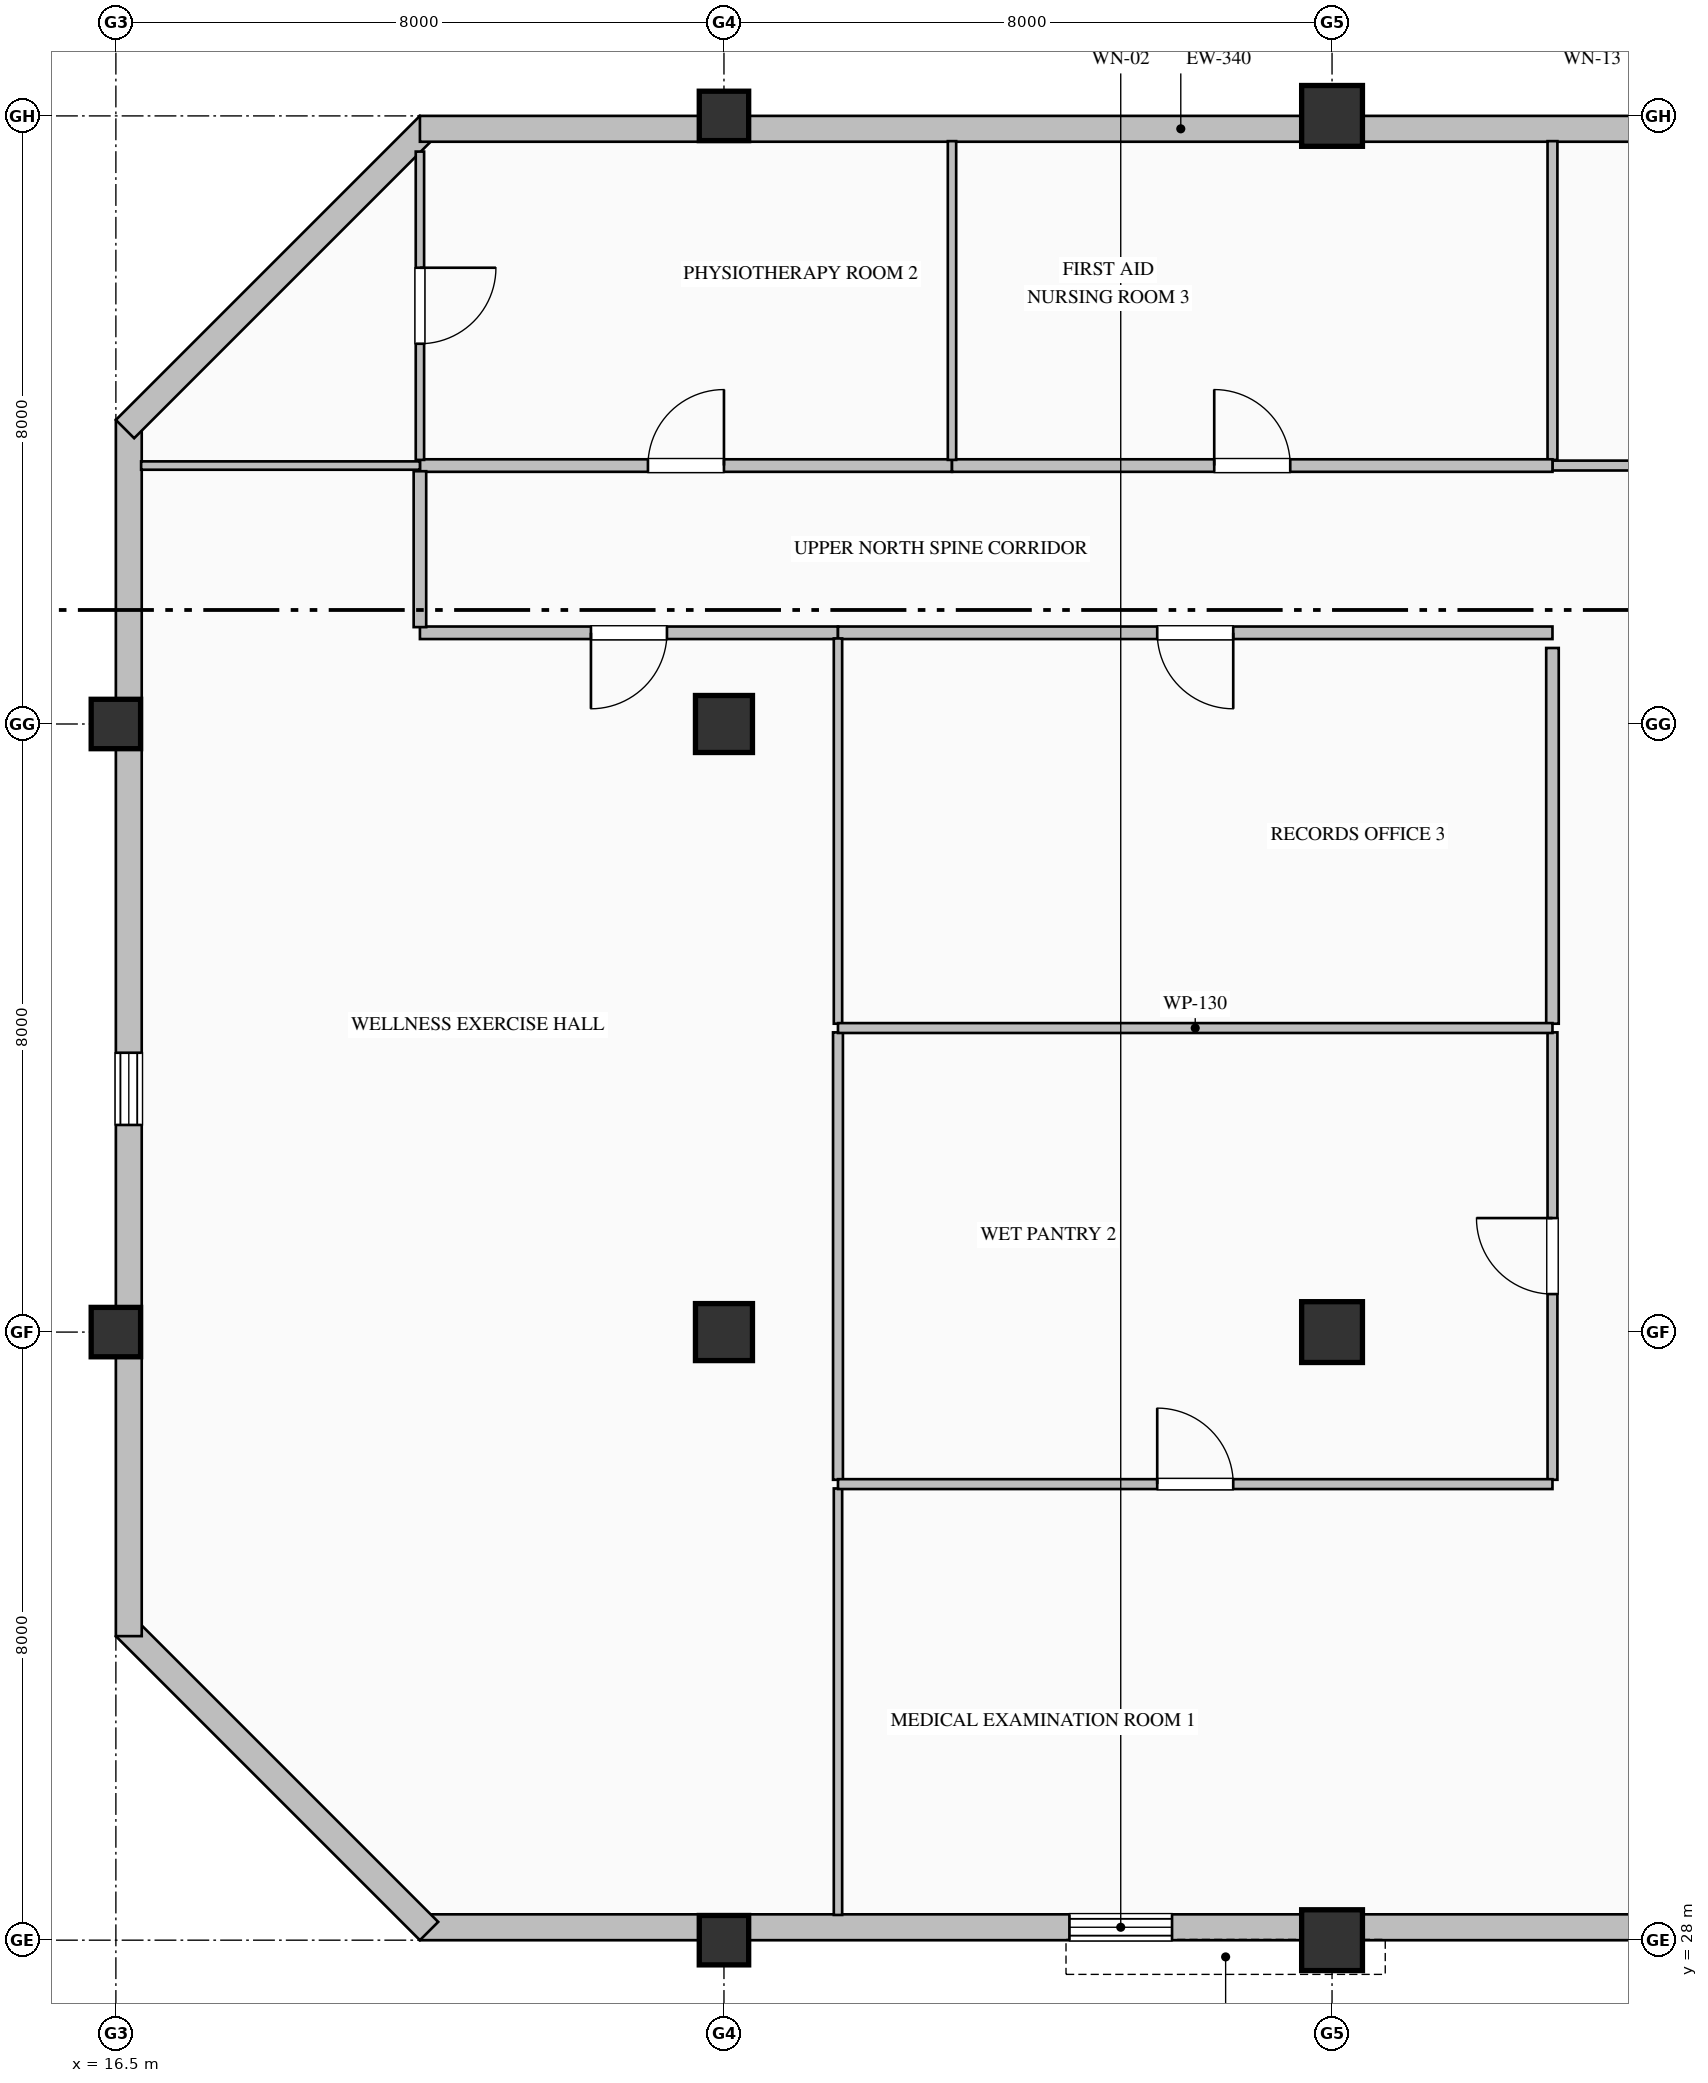
"""IFC4 building model, lengths in metres.
Left out: names, types, materials, properties, quantities, classifications, styles, units other than length and angle.
Written with IfcOpenShell. Run it as: python <this file> out.ifc"""

import sys

from ifc_helpers import new_model, si_unit, direction, frame, frame_2d, origin, origin_2d, place, context, subcontext, project, spatial, rectangle, hollow_rectangle, extrude, element, fill, save


model = new_model("IFC4")
c1 = context("Model", 3, precision=1e-05, world=origin(), true_north=direction((0.0, 1.0)))
c2 = subcontext(c1, "Body", "Model", "MODEL_VIEW")
j1 = project(units=[si_unit("LENGTHUNIT", "METRE"), si_unit("PLANEANGLEUNIT", "RADIAN")], contexts=[c1])
p1 = place(None, origin())
s1 = spatial("IfcSite", under=j1, at=p1, CompositionType="ELEMENT")
p2 = place(p1, origin())
s2 = spatial("IfcBuilding", under=s1, at=p2, CompositionType="ELEMENT")
p3 = place(p2, frame((0.0, 0.0, 343.2)))
s3 = spatial("IfcBuildingStorey", under=s2, at=p3, CompositionType="ELEMENT", Elevation=343.2)
for number, where, z_axis, x_axis in (
    (1, (16.5, 36.0, 0.0), (0.0, 0.0, 1.0), (1.0, 0.0, 0.0)),
    (2, (16.5, 44.0, 0.0), (0.0, 0.0, 1.0), (1.0, 0.0, 0.0)),
    (3, (24.5, 28.0, 0.0), (0.0, 0.0, 1.0), (1.0, 0.0, 0.0)),
):
    element("IfcColumn", number, at=place(p3, frame(where, z_axis=z_axis, x_axis=x_axis)), inside=s3, PredefinedType="COLUMN", context=c2, shape_type="SweptSolid", body=[
        extrude(hollow_rectangle(XDim=0.65, YDim=0.65, WallThickness=0.028, at=origin_2d()), origin(), (0.0, 0.0, 1.0), 4.0),
    ])
for number, where, z_axis, x_axis in (
    (4, (24.5, 36.0, 0.0), (0.0, 0.0, 1.0), (1.0, 0.0, 0.0)),
    (5, (24.5, 44.0, 0.0), (0.0, 0.0, 1.0), (1.0, 0.0, 0.0)),
):
    element("IfcColumn", number, at=place(p3, frame(where, z_axis=z_axis, x_axis=x_axis)), inside=s3, PredefinedType="COLUMN", context=c2, shape_type="SweptSolid", body=[
        extrude(rectangle(XDim=0.75, YDim=0.75, at=origin_2d()), origin(), (0.0, 0.0, 1.0), 4.0),
    ])
p4 = place(p3, frame((24.5, 52.0, 0.0), z_axis=(0.0, 0.0, 1.0), x_axis=(1.0, 0.0, 0.0)))
e6 = element("IfcColumn", 6, at=p4, inside=s3, PredefinedType="COLUMN", context=c2, shape_type="SweptSolid", body=[
    extrude(hollow_rectangle(XDim=0.65, YDim=0.65, WallThickness=0.028, at=origin_2d()), origin(), (0.0, 0.0, 1.0), 4.0),
])
for number, where, z_axis, x_axis in (
    (7, (32.5, 28.0, 0.0), (0.0, 0.0, 1.0), (1.0, 0.0, 0.0)),
    (8, (32.5, 36.0, 0.0), (0.0, 0.0, 1.0), (1.0, 0.0, 0.0)),
    (9, (32.5, 52.0, 0.0), (0.0, 0.0, 1.0), (1.0, 0.0, 0.0)),
):
    element("IfcColumn", number, at=place(p3, frame(where, z_axis=z_axis, x_axis=x_axis)), inside=s3, PredefinedType="COLUMN", context=c2, shape_type="SweptSolid", body=[
        extrude(hollow_rectangle(XDim=0.8, YDim=0.8, WallThickness=0.032, at=origin_2d()), origin(), (0.0, 0.0, 1.0), 4.0),
    ])
p5 = place(p3, frame((40.52, 28.17, 0.0), z_axis=(0.0, 0.0, 1.0), x_axis=(-1.0, 0.0, 0.0)))
e10 = element("IfcWall", 10, at=p5, inside=s3, PredefinedType="SOLIDWALL", context=c2, shape_type="SweptSolid", body=[
    extrude(rectangle(XDim=20.02, YDim=0.34, at=frame_2d((10.01, 0.0))), origin(), (0.0, 0.0, 1.0), 3.185),
])
p6 = place(p5, frame((3.125, 0.0, 0.9)))
e11 = element("IfcOpeningElement", 11, at=p6, cuts=e10, PredefinedType="OPENING", context=c2, shape_type="SweptSolid", body=[
    extrude(rectangle(XDim=0.95, YDim=1.85, at=frame_2d((0.475, 0.925))), frame((0.0, 0.18, 0.0), z_axis=(0.0, -1.0, 0.0), x_axis=(1.0, 0.0, 0.0)), (0.0, 0.0, 1.0), 0.36),
])
p7 = place(p5, frame((10.125, 0.0, 0.9)))
e12 = element("IfcOpeningElement", 12, at=p7, cuts=e10, PredefinedType="OPENING", context=c2, shape_type="SweptSolid", body=[
    extrude(rectangle(XDim=1.35, YDim=1.85, at=frame_2d((0.675, 0.925))), frame((0.0, 0.18, 0.0), z_axis=(0.0, -1.0, 0.0), x_axis=(1.0, 0.0, 0.0)), (0.0, 0.0, 1.0), 0.36),
])
p8 = place(p3, frame((20.62, 28.12, 0.0), z_axis=(0.0, 0.0, 1.0), x_axis=(-0.707106781187, 0.707106781187, 0.0)))
e13 = element("IfcWall", 13, at=p8, inside=s3, PredefinedType="SOLIDWALL", context=c2, shape_type="SweptSolid", body=[
    extrude(rectangle(XDim=5.657, YDim=0.34, at=frame_2d((2.828, 0.0))), origin(), (0.0, 0.0, 1.0), 3.785),
])
p9 = place(p3, frame((16.67, 32.0, 0.0), z_axis=(0.0, 0.0, 1.0), x_axis=(0.0, 1.0, 0.0)))
e14 = element("IfcWall", 14, at=p9, inside=s3, PredefinedType="SOLIDWALL", context=c2, shape_type="SweptSolid", body=[
    extrude(rectangle(XDim=16.0, YDim=0.34, at=frame_2d((8.0, 0.0))), origin(), (0.0, 0.0, 1.0), 3.335),
])
p10 = place(p9, frame((6.725, 0.0, 0.9)))
e15 = element("IfcOpeningElement", 15, at=p10, cuts=e14, PredefinedType="OPENING", context=c2, shape_type="SweptSolid", body=[
    extrude(rectangle(XDim=0.95, YDim=1.85, at=frame_2d((0.475, 0.925))), frame((0.0, 0.18, 0.0), z_axis=(0.0, -1.0, 0.0), x_axis=(1.0, 0.0, 0.0)), (0.0, 0.0, 1.0), 0.36),
])
p11 = place(p3, frame((16.62, 47.88, 0.0), z_axis=(0.0, 0.0, 1.0), x_axis=(0.707106781187, 0.707106781187, 0.0)))
e16 = element("IfcWall", 16, at=p11, inside=s3, PredefinedType="SOLIDWALL", context=c2, shape_type="SweptSolid", body=[
    extrude(rectangle(XDim=5.657, YDim=0.34, at=frame_2d((2.828, 0.0))), origin(), (0.0, 0.0, 1.0), 3.785),
])
p12 = place(p3, frame((20.5, 51.83, 0.0), z_axis=(0.0, 0.0, 1.0), x_axis=(1.0, 0.0, 0.0)))
e17 = element("IfcWall", 17, at=p12, inside=s3, PredefinedType="SOLIDWALL", context=c2, shape_type="SweptSolid", body=[
    extrude(rectangle(XDim=20.02, YDim=0.34, at=frame_2d((10.01, 0.0))), origin(), (0.0, 0.0, 1.0), 3.335),
])
p13 = place(p3, frame((37.8, 47.4, 0.0), z_axis=(0.0, 0.0, 1.0), x_axis=(-1.0, 0.0, 0.0)))
e18 = element("IfcWall", 18, at=p13, inside=s3, PredefinedType="PARTITIONING", context=c2, shape_type="SweptSolid", body=[
    extrude(rectangle(XDim=2.4, YDim=0.13, at=frame_2d((1.2, 0.0))), origin(), (0.0, 0.0, 1.0), 3.785),
])
p14 = place(p3, frame((35.4, 47.475, 0.0), z_axis=(0.0, 0.0, 1.0), x_axis=(0.0, 1.0, 0.0)))
e19 = element("IfcWall", 19, at=p14, inside=s3, PredefinedType="PARTITIONING", context=c2, shape_type="SweptSolid", body=[
    extrude(rectangle(XDim=4.193, YDim=0.13, at=frame_2d((2.097, 0.0))), origin(), (0.0, 0.0, 1.0), 3.785),
])
p15 = place(p3, frame((20.5, 47.4, 0.0), z_axis=(0.0, 0.0, 1.0), x_axis=(1.0, 0.0, 0.0)))
e20 = element("IfcWall", 20, at=p15, inside=s3, PredefinedType="PARTITIONING", context=c2, shape_type="SweptSolid", body=[
    extrude(rectangle(XDim=7.0, YDim=0.165, at=frame_2d((3.5, 0.0))), origin(), (0.0, 0.0, 1.0), 3.785),
])
p16 = place(p15, frame((3.0, 0.0, 0.0)))
e21 = element("IfcOpeningElement", 21, at=p16, cuts=e20, PredefinedType="OPENING", context=c2, shape_type="SweptSolid", body=[
    extrude(rectangle(XDim=1.0, YDim=2.15, at=frame_2d((0.5, 1.075))), frame((0.0, 0.093, 0.0), z_axis=(0.0, -1.0, 0.0), x_axis=(1.0, 0.0, 0.0)), (0.0, 0.0, 1.0), 0.185),
])
p17 = place(p3, frame((27.5, 47.4, 0.0), z_axis=(0.0, 0.0, 1.0), x_axis=(1.0, 0.0, 0.0)))
e22 = element("IfcWall", 22, at=p17, inside=s3, PredefinedType="PARTITIONING", context=c2, shape_type="SweptSolid", body=[
    extrude(rectangle(XDim=7.9, YDim=0.165, at=frame_2d((3.95, 0.0))), origin(), (0.0, 0.0, 1.0), 3.785),
])
p18 = place(p17, frame((3.45, 0.0, 0.0)))
e23 = element("IfcOpeningElement", 23, at=p18, cuts=e22, PredefinedType="OPENING", context=c2, shape_type="SweptSolid", body=[
    extrude(rectangle(XDim=1.0, YDim=2.15, at=frame_2d((0.5, 1.075))), frame((0.0, 0.093, 0.0), z_axis=(0.0, -1.0, 0.0), x_axis=(1.0, 0.0, 0.0)), (0.0, 0.0, 1.0), 0.185),
])
p19 = place(p3, frame((26.0, 45.2, 0.0), z_axis=(0.0, 0.0, 1.0), x_axis=(-1.0, 0.0, 0.0)))
e24 = element("IfcWall", 24, at=p19, inside=s3, PredefinedType="PARTITIONING", context=c2, shape_type="SweptSolid", body=[
    extrude(rectangle(XDim=5.5, YDim=0.165, at=frame_2d((2.75, 0.0))), origin(), (0.0, 0.0, 1.0), 3.785),
])
p20 = place(p19, frame((2.25, 0.0, 0.0)))
e25 = element("IfcOpeningElement", 25, at=p20, cuts=e24, PredefinedType="OPENING", context=c2, shape_type="SweptSolid", body=[
    extrude(rectangle(XDim=1.0, YDim=2.15, at=frame_2d((0.5, 1.075))), frame((0.0, 0.093, 0.0), z_axis=(0.0, -1.0, 0.0), x_axis=(1.0, 0.0, 0.0)), (0.0, 0.0, 1.0), 0.185),
])
p21 = place(p3, frame((20.5, 45.274, 0.0), z_axis=(0.0, 0.0, 1.0), x_axis=(0.0, 1.0, 0.0)))
e26 = element("IfcWall", 26, at=p21, inside=s3, PredefinedType="PARTITIONING", context=c2, shape_type="SweptSolid", body=[
    extrude(rectangle(XDim=2.051, YDim=0.165, at=frame_2d((1.025, 0.0))), origin(), (0.0, 0.0, 1.0), 3.785),
])
p22 = place(p3, frame((35.4, 45.2, 0.0), z_axis=(0.0, 0.0, 1.0), x_axis=(-1.0, 0.0, 0.0)))
e27 = element("IfcWall", 27, at=p22, inside=s3, PredefinedType="PARTITIONING", context=c2, shape_type="SweptSolid", body=[
    extrude(rectangle(XDim=9.4, YDim=0.165, at=frame_2d((4.7, 0.0))), origin(), (0.0, 0.0, 1.0), 3.785),
])
p23 = place(p22, frame((4.2, 0.0, 0.0)))
e28 = element("IfcOpeningElement", 28, at=p23, cuts=e27, PredefinedType="OPENING", context=c2, shape_type="SweptSolid", body=[
    extrude(rectangle(XDim=1.0, YDim=2.15, at=frame_2d((0.5, 1.075))), frame((0.0, 0.093, 0.0), z_axis=(0.0, -1.0, 0.0), x_axis=(1.0, 0.0, 0.0)), (0.0, 0.0, 1.0), 0.185),
])
p24 = place(p3, frame((35.4, 34.057, 0.0), z_axis=(0.0, 0.0, 1.0), x_axis=(0.0, 1.0, 0.0)))
e29 = element("IfcWall", 29, at=p24, inside=s3, PredefinedType="PARTITIONING", context=c2, shape_type="SweptSolid", body=[
    extrude(rectangle(XDim=5.886, YDim=0.13, at=frame_2d((2.943, 0.0))), origin(), (0.0, 0.0, 1.0), 3.785),
])
p25 = place(p24, frame((2.443, 0.0, 0.0)))
e30 = element("IfcOpeningElement", 30, at=p25, cuts=e29, PredefinedType="OPENING", context=c2, shape_type="SweptSolid", body=[
    extrude(rectangle(XDim=1.0, YDim=2.15, at=frame_2d((0.5, 1.075))), frame((0.0, 0.075, 0.0), z_axis=(0.0, -1.0, 0.0), x_axis=(1.0, 0.0, 0.0)), (0.0, 0.0, 1.0), 0.15),
])
p26 = place(p3, frame((35.4, 40.057, 0.0), z_axis=(0.0, 0.0, 1.0), x_axis=(0.0, 1.0, 0.0)))
e31 = element("IfcWall", 31, at=p26, inside=s3, PredefinedType="PARTITIONING", context=c2, shape_type="SweptSolid", body=[
    extrude(rectangle(XDim=4.943, YDim=0.165, at=frame_2d((2.472, 0.0))), origin(), (0.0, 0.0, 1.0), 3.785),
])
p27 = place(p3, frame((20.5, 51.531, 0.0), z_axis=(0.0, 0.0, 1.0), x_axis=(0.0, -1.0, 0.0)))
e32 = element("IfcWall", 32, at=p27, inside=s3, PredefinedType="MOVABLE", context=c2, shape_type="SweptSolid", body=[
    extrude(rectangle(XDim=4.056, YDim=0.11, at=frame_2d((2.028, 0.0))), origin(), (0.0, 0.0, 1.0), 3.785),
])
p28 = place(p27, frame((1.528, 0.0, 0.0)))
e33 = element("IfcOpeningElement", 33, at=p28, cuts=e32, PredefinedType="OPENING", context=c2, shape_type="SweptSolid", body=[
    extrude(rectangle(XDim=1.0, YDim=2.15, at=frame_2d((0.5, 1.075))), frame((0.0, 0.065, 0.0), z_axis=(0.0, -1.0, 0.0), x_axis=(1.0, 0.0, 0.0)), (0.0, 0.0, 1.0), 0.13),
])
p29 = place(p3, frame((20.5, 47.4, 0.0), z_axis=(0.0, 0.0, 1.0), x_axis=(-1.0, 0.0, 0.0)))
e34 = element("IfcWall", 34, at=p29, inside=s3, PredefinedType="MOVABLE", context=c2, shape_type="SweptSolid", body=[
    extrude(rectangle(XDim=3.668, YDim=0.11, at=frame_2d((1.834, 0.0))), origin(), (0.0, 0.0, 1.0), 3.785),
])
p30 = place(p3, frame((27.5, 51.668, 0.0), z_axis=(0.0, 0.0, 1.0), x_axis=(0.0, -1.0, 0.0)))
e35 = element("IfcWall", 35, at=p30, inside=s3, PredefinedType="MOVABLE", context=c2, shape_type="SweptSolid", body=[
    extrude(rectangle(XDim=4.193, YDim=0.11, at=frame_2d((2.097, 0.0))), origin(), (0.0, 0.0, 1.0), 3.785),
])
p31 = place(p3, frame((26.0, 33.943, 0.0), z_axis=(0.0, 0.0, 1.0), x_axis=(0.0, -1.0, 0.0)))
e36 = element("IfcWall", 36, at=p31, inside=s3, PredefinedType="MOVABLE", context=c2, shape_type="SweptSolid", body=[
    extrude(rectangle(XDim=5.611, YDim=0.11, at=frame_2d((2.806, 0.0))), origin(), (0.0, 0.0, 1.0), 3.785),
])
p32 = place(p3, frame((26.0, 39.943, 0.0), z_axis=(0.0, 0.0, 1.0), x_axis=(0.0, -1.0, 0.0)))
e37 = element("IfcWall", 37, at=p32, inside=s3, PredefinedType="PARTITIONING", context=c2, shape_type="SweptSolid", body=[
    extrude(rectangle(XDim=5.886, YDim=0.13, at=frame_2d((2.943, 0.0))), origin(), (0.0, 0.0, 1.0), 3.785),
])
p33 = place(p3, frame((26.0, 45.125, 0.0), z_axis=(0.0, 0.0, 1.0), x_axis=(0.0, -1.0, 0.0)))
e38 = element("IfcWall", 38, at=p33, inside=s3, PredefinedType="MOVABLE", context=c2, shape_type="SweptSolid", body=[
    extrude(rectangle(XDim=5.069, YDim=0.11, at=frame_2d((2.534, 0.0))), origin(), (0.0, 0.0, 1.0), 3.785),
])
p34 = place(p3, frame((26.0, 34.0, 0.0), z_axis=(0.0, 0.0, 1.0), x_axis=(1.0, 0.0, 0.0)))
e39 = element("IfcWall", 39, at=p34, inside=s3, PredefinedType="PARTITIONING", context=c2, shape_type="SweptSolid", body=[
    extrude(rectangle(XDim=9.4, YDim=0.13, at=frame_2d((4.7, 0.0))), origin(), (0.0, 0.0, 1.0), 3.785),
])
p35 = place(p34, frame((4.2, 0.0, 0.0)))
e40 = element("IfcOpeningElement", 40, at=p35, cuts=e39, PredefinedType="OPENING", context=c2, shape_type="SweptSolid", body=[
    extrude(rectangle(XDim=1.0, YDim=2.15, at=frame_2d((0.5, 1.075))), frame((0.0, 0.075, 0.0), z_axis=(0.0, -1.0, 0.0), x_axis=(1.0, 0.0, 0.0)), (0.0, 0.0, 1.0), 0.15),
])
p36 = place(p3, frame((26.0, 40.0, 0.0), z_axis=(0.0, 0.0, 1.0), x_axis=(1.0, 0.0, 0.0)))
e41 = element("IfcWall", 41, at=p36, inside=s3, PredefinedType="PARTITIONING", context=c2, shape_type="SweptSolid", body=[
    extrude(rectangle(XDim=9.4, YDim=0.13, at=frame_2d((4.7, 0.0))), origin(), (0.0, 0.0, 1.0), 3.785),
])
p37 = place(p7, origin())
e42 = element("IfcWindow", 42, at=p37, inside=s3, PartitioningType="DOUBLE_PANEL_VERTICAL", PredefinedType="WINDOW", context=c2, shape_type="SweptSolid", body=[
    extrude(rectangle(XDim=1.35, YDim=1.85, at=frame_2d((0.675, 0.925))), frame((0.0, 0.15, 0.0), z_axis=(0.0, -1.0, 0.0), x_axis=(1.0, 0.0, 0.0)), (0.0, 0.0, 1.0), 0.06),
])
fill(e12, e42)
p38 = place(p10, origin())
e43 = element("IfcWindow", 43, at=p38, inside=s3, PartitioningType="SINGLE_PANEL", PredefinedType="WINDOW", context=c2, shape_type="SweptSolid", body=[
    extrude(rectangle(XDim=0.95, YDim=1.85, at=frame_2d((0.475, 0.925))), frame((0.0, 0.15, 0.0), z_axis=(0.0, -1.0, 0.0), x_axis=(1.0, 0.0, 0.0)), (0.0, 0.0, 1.0), 0.06),
])
fill(e15, e43)
p39 = place(p28, origin())
e44 = element("IfcDoor", 44, at=p39, inside=s3, OperationType="SINGLE_SWING_LEFT", PredefinedType="DOOR", context=c2, shape_type="SweptSolid", body=[
    extrude(rectangle(XDim=1.0, YDim=2.15, at=frame_2d((0.5, 1.075))), frame((0.0, 0.025, 0.0), z_axis=(0.0, -1.0, 0.0), x_axis=(1.0, 0.0, 0.0)), (0.0, 0.0, 1.0), 0.05),
])
fill(e33, e44)
p40 = place(p16, origin())
e45 = element("IfcDoor", 45, at=p40, inside=s3, OperationType="SINGLE_SWING_RIGHT", PredefinedType="DOOR", context=c2, shape_type="SweptSolid", body=[
    extrude(rectangle(XDim=1.0, YDim=2.15, at=frame_2d((0.5, 1.075))), frame((0.0, 0.025, 0.0), z_axis=(0.0, -1.0, 0.0), x_axis=(1.0, 0.0, 0.0)), (0.0, 0.0, 1.0), 0.05),
])
fill(e21, e45)
p41 = place(p18, origin())
e46 = element("IfcDoor", 46, at=p41, inside=s3, OperationType="SINGLE_SWING_LEFT", PredefinedType="DOOR", context=c2, shape_type="SweptSolid", body=[
    extrude(rectangle(XDim=1.0, YDim=2.15, at=frame_2d((0.5, 1.075))), frame((0.0, 0.025, 0.0), z_axis=(0.0, -1.0, 0.0), x_axis=(1.0, 0.0, 0.0)), (0.0, 0.0, 1.0), 0.05),
])
fill(e23, e46)
p42 = place(p20, origin())
e47 = element("IfcDoor", 47, at=p42, inside=s3, OperationType="SINGLE_SWING_RIGHT", PredefinedType="DOOR", context=c2, shape_type="SweptSolid", body=[
    extrude(rectangle(XDim=1.0, YDim=2.15, at=frame_2d((0.5, 1.075))), frame((0.0, 0.025, 0.0), z_axis=(0.0, -1.0, 0.0), x_axis=(1.0, 0.0, 0.0)), (0.0, 0.0, 1.0), 0.05),
])
fill(e25, e47)
p43 = place(p35, origin())
e48 = element("IfcDoor", 48, at=p43, inside=s3, OperationType="SINGLE_SWING_LEFT", PredefinedType="DOOR", context=c2, shape_type="SweptSolid", body=[
    extrude(rectangle(XDim=1.0, YDim=2.15, at=frame_2d((0.5, 1.075))), frame((0.0, 0.025, 0.0), z_axis=(0.0, -1.0, 0.0), x_axis=(1.0, 0.0, 0.0)), (0.0, 0.0, 1.0), 0.05),
])
fill(e40, e48)
p44 = place(p25, origin())
e49 = element("IfcDoor", 49, at=p44, inside=s3, OperationType="SINGLE_SWING_RIGHT", PredefinedType="DOOR", context=c2, shape_type="SweptSolid", body=[
    extrude(rectangle(XDim=1.0, YDim=2.15, at=frame_2d((0.5, 1.075))), frame((0.0, 0.025, 0.0), z_axis=(0.0, -1.0, 0.0), x_axis=(1.0, 0.0, 0.0)), (0.0, 0.0, 1.0), 0.05),
])
fill(e30, e49)
p45 = place(p23, origin())
e50 = element("IfcDoor", 50, at=p45, inside=s3, OperationType="SINGLE_SWING_LEFT", PredefinedType="DOOR", context=c2, shape_type="SweptSolid", body=[
    extrude(rectangle(XDim=1.0, YDim=2.15, at=frame_2d((0.5, 1.075))), frame((0.0, 0.025, 0.0), z_axis=(0.0, -1.0, 0.0), x_axis=(1.0, 0.0, 0.0)), (0.0, 0.0, 1.0), 0.05),
])
fill(e28, e50)
save(model, sys.argv[1])
